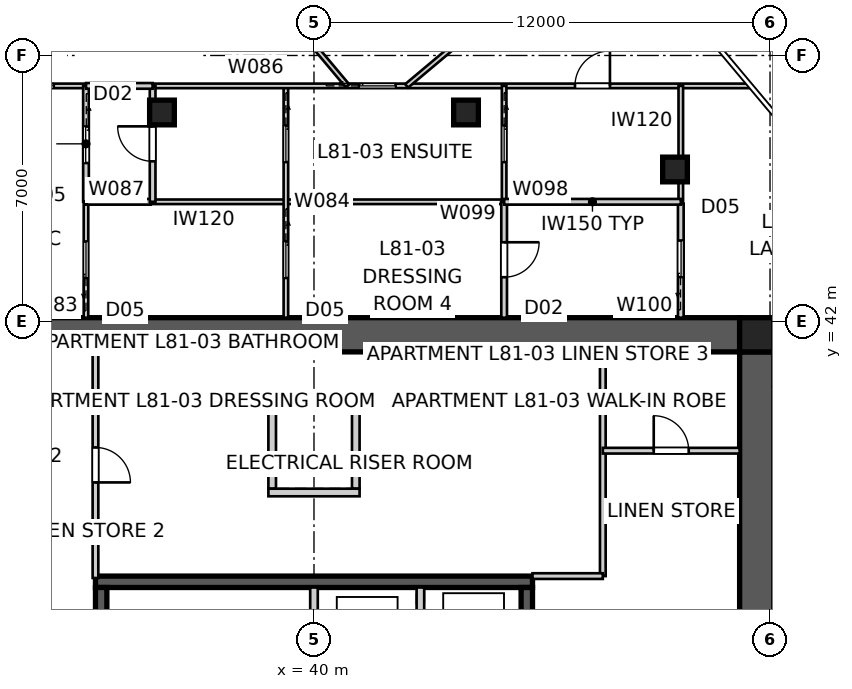
"""IFC4 building model, lengths in metres.
Left out: names, types, materials, properties, quantities, classifications, styles, units other than length and angle.
Written with IfcOpenShell. Run it as: python <this file> out.ifc"""

import sys

from ifc_helpers import new_model, si_unit, direction, frame, frame_2d, origin, origin_2d, place, context, subcontext, project, spatial, polyline, rectangle, outline, extrude, element, fill, save


model = new_model("IFC4")
c1 = context("Model", 3, precision=1e-05, world=origin(), true_north=direction((0.0, 1.0)))
c2 = subcontext(c1, "Body", "Model", "MODEL_VIEW")
j1 = project(units=[si_unit("LENGTHUNIT", "METRE"), si_unit("PLANEANGLEUNIT", "RADIAN")], contexts=[c1])
p1 = place(None, origin())
s1 = spatial("IfcSite", under=j1, at=p1, CompositionType="ELEMENT")
p2 = place(p1, origin())
s2 = spatial("IfcBuilding", under=s1, at=p2, CompositionType="ELEMENT")
p3 = place(p2, frame((0.0, 0.0, 293.0)))
s3 = spatial("IfcBuildingStorey", under=s2, at=p3, CompositionType="ELEMENT", Elevation=293.0)
p4 = place(p3, frame((28.8, 41.65, 0.0), z_axis=(0.0, 0.0, 1.0), x_axis=(1.0, 0.0, 0.0)))
e1 = element("IfcWall", 1, at=p4, inside=s3, PredefinedType="SHEAR", context=c2, shape_type="SweptSolid", body=[
    extrude(outline(polyline([(0.0, -0.45), (22.4, -0.45), (22.4, -0.025), (22.85, -0.025), (22.85, 0.025), (22.4, 0.025), (22.4, 0.45), (0.0, 0.45), (0.0, 0.025), (-0.45, 0.025), (-0.45, -0.025), (0.0, -0.025), (0.0, -0.45)])), origin(), (0.0, 0.0, 1.0), 3.4),
])
p5 = place(p3, frame((51.65, 18.8, 0.0), z_axis=(0.0, 0.0, 1.0), x_axis=(0.0, 1.0, 0.0)))
e2 = element("IfcWall", 2, at=p5, inside=s3, PredefinedType="SHEAR", context=c2, shape_type="SweptSolid", body=[
    extrude(outline(polyline([(0.0, -0.45), (22.4, -0.45), (22.4, -0.025), (22.85, -0.025), (22.85, 0.025), (22.4, 0.025), (22.4, 0.45), (0.0, 0.45), (0.0, 0.025), (-0.45, 0.025), (-0.45, -0.025), (0.0, -0.025), (0.0, -0.45)])), origin(), (0.0, 0.0, 1.0), 3.4),
])
p6 = place(p5, frame((11.14, 0.0, 0.0)))
e3 = element("IfcOpeningElement", 3, at=p6, cuts=e2, PredefinedType="OPENING", context=c2, shape_type="SweptSolid", body=[
    extrude(rectangle(XDim=1.02, YDim=2.4, at=frame_2d((0.51, 1.2))), frame((0.0, 0.46, 0.0), z_axis=(0.0, -1.0, 0.0), x_axis=(1.0, 0.0, 0.0)), (0.0, 0.0, 1.0), 0.92),
])
p7 = place(p3, frame((34.25, 35.15, 0.0), z_axis=(0.0, 0.0, 1.0), x_axis=(1.0, 0.0, 0.0)))
e4 = element("IfcWall", 4, at=p7, inside=s3, PredefinedType="SHEAR", context=c2, shape_type="SweptSolid", body=[
    extrude(rectangle(XDim=11.5, YDim=0.3, at=frame_2d((5.75, 0.0))), origin(), (0.0, 0.0, 1.0), 3.4),
])
p8 = place(p3, frame((34.4, 32.2, 0.0), z_axis=(0.0, 0.0, 1.0), x_axis=(0.0, 1.0, 0.0)))
e5 = element("IfcWall", 5, at=p8, inside=s3, PredefinedType="SHEAR", context=c2, shape_type="SweptSolid", body=[
    extrude(rectangle(XDim=2.8, YDim=0.3, at=frame_2d((1.4, 0.0))), origin(), (0.0, 0.0, 1.0), 3.4),
])
for number, where, z_axis, x_axis in (
    (6, (40.0, 32.2, 0.0), (0.0, 0.0, 1.0), (0.0, 1.0, 0.0)),
    (7, (42.8, 32.2, 0.0), (0.0, 0.0, 1.0), (0.0, 1.0, 0.0)),
):
    element("IfcWall", number, at=place(p3, frame(where, z_axis=z_axis, x_axis=x_axis)), inside=s3, PredefinedType="SOLIDWALL", context=c2, shape_type="SweptSolid", body=[
        extrude(rectangle(XDim=2.8, YDim=0.2, at=frame_2d((1.4, 0.0))), origin(), (0.0, 0.0, 1.0), 3.4),
    ])
p9 = place(p3, frame((45.6, 32.2, 0.0), z_axis=(0.0, 0.0, 1.0), x_axis=(0.0, 1.0, 0.0)))
e8 = element("IfcWall", 8, at=p9, inside=s3, PredefinedType="SHEAR", context=c2, shape_type="SweptSolid", body=[
    extrude(rectangle(XDim=2.8, YDim=0.3, at=frame_2d((1.4, 0.0))), origin(), (0.0, 0.0, 1.0), 3.4),
])
for number, where, z_axis, x_axis in (
    (9, (38.9, 37.6, 0.0), (0.0, 0.0, 1.0), (0.0, 1.0, 0.0)),
    (10, (41.1, 37.6, 0.0), (0.0, 0.0, 1.0), (0.0, 1.0, 0.0)),
):
    element("IfcWall", number, at=place(p3, frame(where, z_axis=z_axis, x_axis=x_axis)), inside=s3, PredefinedType="SOLIDWALL", context=c2, shape_type="SweptSolid", body=[
        extrude(rectangle(XDim=2.0, YDim=0.2, at=frame_2d((1.0, 0.0))), origin(), (0.0, 0.0, 1.0), 3.4),
    ])
for number, where, z_axis, x_axis in (
    (11, (38.8, 37.5, 0.0), (0.0, 0.0, 1.0), (1.0, 0.0, 0.0)),
    (12, (38.8, 39.7, 0.0), (0.0, 0.0, 1.0), (1.0, 0.0, 0.0)),
):
    element("IfcWall", number, at=place(p3, frame(where, z_axis=z_axis, x_axis=x_axis)), inside=s3, PredefinedType="SOLIDWALL", context=c2, shape_type="SweptSolid", body=[
        extrude(rectangle(XDim=2.4, YDim=0.2, at=frame_2d((1.2, 0.0))), origin(), (0.0, 0.0, 1.0), 3.4),
    ])
p10 = place(p3, frame((51.65, 41.65, 0.0), z_axis=(0.0, 0.0, 1.0), x_axis=(1.0, 0.0, 0.0)))
e13 = element("IfcColumn", 13, at=p10, inside=s3, PredefinedType="COLUMN", context=c2, shape_type="SweptSolid", body=[
    extrude(rectangle(XDim=0.9, YDim=0.9, at=origin_2d()), origin(), (0.0, 0.0, 1.0), 3.4),
])
for number, where, z_axis, x_axis in (
    (14, (49.5, 46.0, 0.0), (0.0, 0.0, 1.0), (1.0, 0.0, 0.0)),
    (15, (44.0, 47.5, 0.0), (0.0, 0.0, 1.0), (1.0, 0.0, 0.0)),
    (16, (36.0, 47.5, 0.0), (0.0, 0.0, 1.0), (1.0, 0.0, 0.0)),
):
    element("IfcColumn", number, at=place(p3, frame(where, z_axis=z_axis, x_axis=x_axis)), inside=s3, PredefinedType="COLUMN", context=c2, shape_type="SweptSolid", body=[
        extrude(rectangle(XDim=0.65, YDim=0.65, at=origin_2d()), origin(), (0.0, 0.0, 1.0), 3.4),
    ])
p11 = place(p3, frame((55.704, 43.177, 0.0), z_axis=(0.0, 0.0, 1.0), x_axis=(-0.76603440109, -0.64279957712, 0.0)))
e17 = element("IfcWall", 17, at=p11, inside=s3, PredefinedType="PARTITIONING", context=c2, shape_type="SweptSolid", body=[
    extrude(rectangle(XDim=4.64, YDim=0.25, at=frame_2d((2.32, 0.0))), origin(), (0.0, 0.0, 1.0), 3.25),
])
p12 = place(p3, frame((34.25, 41.2, 0.0), z_axis=(0.0, 0.0, 1.0), x_axis=(0.0, -1.0, 0.0)))
e18 = element("IfcWall", 18, at=p12, inside=s3, PredefinedType="SOLIDWALL", context=c2, shape_type="SweptSolid", body=[
    extrude(rectangle(XDim=5.95, YDim=0.15, at=frame_2d((2.975, 0.0))), origin(), (0.0, 0.0, 1.0), 3.25),
])
p13 = place(p12, frame((2.515, 0.0, 0.0)))
e19 = element("IfcOpeningElement", 19, at=p13, cuts=e18, PredefinedType="OPENING", context=c2, shape_type="SweptSolid", body=[
    extrude(rectangle(XDim=0.92, YDim=2.1, at=frame_2d((0.46, 1.05))), frame((0.0, 0.085, 0.0), z_axis=(0.0, -1.0, 0.0), x_axis=(1.0, 0.0, 0.0)), (0.0, 0.0, 1.0), 0.17),
])
p14 = place(p3, frame((47.6, 41.2, 0.0), z_axis=(0.0, 0.0, 1.0), x_axis=(0.0, -1.0, 0.0)))
e20 = element("IfcWall", 20, at=p14, inside=s3, PredefinedType="SOLIDWALL", context=c2, shape_type="SweptSolid", body=[
    extrude(rectangle(XDim=5.9, YDim=0.15, at=frame_2d((2.95, 0.0))), origin(), (0.0, 0.0, 1.0), 3.25),
])
p15 = place(p3, frame((47.6, 35.3, 0.0), z_axis=(0.0, 0.0, 1.0), x_axis=(-1.0, 0.0, 0.0)))
e21 = element("IfcWall", 21, at=p15, inside=s3, PredefinedType="SOLIDWALL", context=c2, shape_type="SweptSolid", body=[
    extrude(rectangle(XDim=1.85, YDim=0.15, at=frame_2d((0.925, 0.0))), origin(), (0.0, 0.0, 1.0), 3.25),
])
p16 = place(p3, frame((47.6, 38.6, 0.0), z_axis=(0.0, 0.0, 1.0), x_axis=(1.0, 0.0, 0.0)))
e22 = element("IfcWall", 22, at=p16, inside=s3, PredefinedType="SOLIDWALL", context=c2, shape_type="SweptSolid", body=[
    extrude(rectangle(XDim=3.6, YDim=0.15, at=frame_2d((1.8, 0.0))), origin(), (0.0, 0.0, 1.0), 3.25),
])
p17 = place(p16, frame((1.34, 0.0, 0.0)))
e23 = element("IfcOpeningElement", 23, at=p17, cuts=e22, PredefinedType="OPENING", context=c2, shape_type="SweptSolid", body=[
    extrude(rectangle(XDim=0.92, YDim=2.1, at=frame_2d((0.46, 1.05))), frame((0.0, 0.085, 0.0), z_axis=(0.0, -1.0, 0.0), x_axis=(1.0, 0.0, 0.0)), (0.0, 0.0, 1.0), 0.17),
])
p18 = place(p3, frame((35.704, 45.15, 0.0), z_axis=(0.0, 0.0, 1.0), x_axis=(1.0, 0.0, 0.0)))
e24 = element("IfcWall", 24, at=p18, inside=s3, PredefinedType="PARTITIONING", context=c2, shape_type="SweptSolid", body=[
    extrude(rectangle(XDim=9.3, YDim=0.12, at=frame_2d((4.65, 0.0))), origin(), (0.0, 0.0, 1.0), 3.25),
])
p19 = place(p3, frame((34.0, 42.1, 0.0), z_axis=(0.0, 0.0, 1.0), x_axis=(0.0, 1.0, 0.0)))
e25 = element("IfcWall", 25, at=p19, inside=s3, PredefinedType="PARTITIONING", context=c2, shape_type="SweptSolid", body=[
    extrude(rectangle(XDim=3.05, YDim=0.12, at=frame_2d((1.525, 0.0))), origin(), (0.0, 0.0, 1.0), 3.25),
])
p20 = place(p19, frame((1.045, 0.0, 0.0)))
e26 = element("IfcOpeningElement", 26, at=p20, cuts=e25, PredefinedType="OPENING", context=c2, shape_type="SweptSolid", body=[
    extrude(rectangle(XDim=0.96, YDim=2.1, at=frame_2d((0.48, 1.05))), frame((0.0, 0.07, 0.0), z_axis=(0.0, -1.0, 0.0), x_axis=(1.0, 0.0, 0.0)), (0.0, 0.0, 1.0), 0.14),
])
p21 = place(p3, frame((39.26, 48.2, 0.0), z_axis=(0.0, 0.0, 1.0), x_axis=(0.0, -1.0, 0.0)))
e27 = element("IfcWall", 27, at=p21, inside=s3, PredefinedType="PARTITIONING", context=c2, shape_type="SweptSolid", body=[
    extrude(rectangle(XDim=6.1, YDim=0.12, at=frame_2d((3.05, 0.0))), origin(), (0.0, 0.0, 1.0), 3.25),
])
p22 = place(p21, frame((4.095, 0.0, 0.0)))
e28 = element("IfcOpeningElement", 28, at=p22, cuts=e27, PredefinedType="OPENING", context=c2, shape_type="SweptSolid", body=[
    extrude(rectangle(XDim=0.96, YDim=2.1, at=frame_2d((0.48, 1.05))), frame((0.0, 0.07, 0.0), z_axis=(0.0, -1.0, 0.0), x_axis=(1.0, 0.0, 0.0)), (0.0, 0.0, 1.0), 0.14),
])
p23 = place(p21, frame((1.045, 0.0, 0.0)))
e29 = element("IfcOpeningElement", 29, at=p23, cuts=e27, PredefinedType="OPENING", context=c2, shape_type="SweptSolid", body=[
    extrude(rectangle(XDim=0.96, YDim=2.1, at=frame_2d((0.48, 1.05))), frame((0.0, 0.07, 0.0), z_axis=(0.0, -1.0, 0.0), x_axis=(1.0, 0.0, 0.0)), (0.0, 0.0, 1.0), 0.14),
])
p24 = place(p3, frame((34.0, 45.15, 0.0), z_axis=(0.0, 0.0, 1.0), x_axis=(1.0, 0.0, 0.0)))
e30 = element("IfcWall", 30, at=p24, inside=s3, PredefinedType="SOLIDWALL", context=c2, shape_type="SweptSolid", body=[
    extrude(rectangle(XDim=1.703, YDim=0.15, at=frame_2d((0.852, 0.0))), origin(), (0.0, 0.0, 1.0), 3.25),
])
p25 = place(p3, frame((35.754, 48.2, 0.0), z_axis=(0.0, 0.0, 1.0), x_axis=(1.0, 0.0, 0.0)))
e31 = element("IfcWall", 31, at=p25, inside=s3, PredefinedType="PARTITIONING", context=c2, shape_type="SweptSolid", body=[
    extrude(rectangle(XDim=15.683, YDim=0.12, at=frame_2d((7.842, 0.0))), origin(), (0.0, 0.0, 1.0), 3.25),
])
p26 = place(p25, frame((5.433, 0.0, 0.0)))
e32 = element("IfcOpeningElement", 32, at=p26, cuts=e31, PredefinedType="OPENING", context=c2, shape_type="SweptSolid", body=[
    extrude(rectangle(XDim=0.96, YDim=2.1, at=frame_2d((0.48, 1.05))), frame((0.0, 0.07, 0.0), z_axis=(0.0, -1.0, 0.0), x_axis=(1.0, 0.0, 0.0)), (0.0, 0.0, 1.0), 0.14),
])
p27 = place(p25, frame((11.114, 0.0, 0.0)))
e33 = element("IfcOpeningElement", 33, at=p27, cuts=e31, PredefinedType="OPENING", context=c2, shape_type="SweptSolid", body=[
    extrude(rectangle(XDim=0.92, YDim=2.34, at=frame_2d((0.46, 1.17))), frame((0.0, 0.07, 0.0), z_axis=(0.0, -1.0, 0.0), x_axis=(1.0, 0.0, 0.0)), (0.0, 0.0, 1.0), 0.14),
])
p28 = place(p3, frame((35.754, 45.15, 0.0), z_axis=(0.0, 0.0, 1.0), x_axis=(0.0, 1.0, 0.0)))
e34 = element("IfcWall", 34, at=p28, inside=s3, PredefinedType="SOLIDWALL", context=c2, shape_type="SweptSolid", body=[
    extrude(rectangle(XDim=3.05, YDim=0.15, at=frame_2d((1.525, 0.0))), origin(), (0.0, 0.0, 1.0), 3.25),
])
p29 = place(p28, frame((1.065, 0.0, 0.0)))
e35 = element("IfcOpeningElement", 35, at=p29, cuts=e34, PredefinedType="OPENING", context=c2, shape_type="SweptSolid", body=[
    extrude(rectangle(XDim=0.92, YDim=2.34, at=frame_2d((0.46, 1.17))), frame((0.0, 0.085, 0.0), z_axis=(0.0, -1.0, 0.0), x_axis=(1.0, 0.0, 0.0)), (0.0, 0.0, 1.0), 0.17),
])
p30 = place(p3, frame((31.344, 48.2, 0.0), z_axis=(0.0, 0.0, 1.0), x_axis=(1.0, 0.0, 0.0)))
e36 = element("IfcWall", 36, at=p30, inside=s3, PredefinedType="PARTITIONING", context=c2, shape_type="SweptSolid", body=[
    extrude(rectangle(XDim=2.656, YDim=0.12, at=frame_2d((1.328, 0.0))), origin(), (0.0, 0.0, 1.0), 3.25),
])
p31 = place(p30, frame((0.848, 0.0, 0.0)))
e37 = element("IfcOpeningElement", 37, at=p31, cuts=e36, PredefinedType="OPENING", context=c2, shape_type="SweptSolid", body=[
    extrude(rectangle(XDim=0.96, YDim=2.1, at=frame_2d((0.48, 1.05))), frame((0.0, 0.07, 0.0), z_axis=(0.0, -1.0, 0.0), x_axis=(1.0, 0.0, 0.0)), (0.0, 0.0, 1.0), 0.14),
])
p32 = place(p3, frame((34.0, 48.2, 0.0), z_axis=(0.0, 0.0, 1.0), x_axis=(0.0, -1.0, 0.0)))
e38 = element("IfcWall", 38, at=p32, inside=s3, PredefinedType="SOLIDWALL", context=c2, shape_type="SweptSolid", body=[
    extrude(rectangle(XDim=3.05, YDim=0.15, at=frame_2d((1.525, 0.0))), origin(), (0.0, 0.0, 1.0), 3.25),
])
p33 = place(p32, frame((1.07, 0.0, 0.0)))
e39 = element("IfcOpeningElement", 39, at=p33, cuts=e38, PredefinedType="OPENING", context=c2, shape_type="SweptSolid", body=[
    extrude(rectangle(XDim=0.96, YDim=2.1, at=frame_2d((0.48, 1.05))), frame((0.0, 0.085, 0.0), z_axis=(0.0, -1.0, 0.0), x_axis=(1.0, 0.0, 0.0)), (0.0, 0.0, 1.0), 0.17),
])
p34 = place(p3, frame((45.003, 48.2, 0.0), z_axis=(0.0, 0.0, 1.0), x_axis=(0.0, -1.0, 0.0)))
e40 = element("IfcWall", 40, at=p34, inside=s3, PredefinedType="PARTITIONING", context=c2, shape_type="SweptSolid", body=[
    extrude(rectangle(XDim=3.05, YDim=0.12, at=frame_2d((1.525, 0.0))), origin(), (0.0, 0.0, 1.0), 3.25),
])
p35 = place(p34, frame((1.045, 0.0, 0.0)))
e41 = element("IfcOpeningElement", 41, at=p35, cuts=e40, PredefinedType="OPENING", context=c2, shape_type="SweptSolid", body=[
    extrude(rectangle(XDim=0.96, YDim=2.1, at=frame_2d((0.48, 1.05))), frame((0.0, 0.07, 0.0), z_axis=(0.0, -1.0, 0.0), x_axis=(1.0, 0.0, 0.0)), (0.0, 0.0, 1.0), 0.14),
])
p36 = place(p3, frame((45.003, 45.15, 0.0), z_axis=(0.0, 0.0, 1.0), x_axis=(0.0, -1.0, 0.0)))
e42 = element("IfcWall", 42, at=p36, inside=s3, PredefinedType="SOLIDWALL", context=c2, shape_type="SweptSolid", body=[
    extrude(rectangle(XDim=3.05, YDim=0.15, at=frame_2d((1.525, 0.0))), origin(), (0.0, 0.0, 1.0), 3.25),
])
p37 = place(p36, frame((1.065, 0.0, 0.0)))
e43 = element("IfcOpeningElement", 43, at=p37, cuts=e42, PredefinedType="OPENING", context=c2, shape_type="SweptSolid", body=[
    extrude(rectangle(XDim=0.92, YDim=2.34, at=frame_2d((0.46, 1.17))), frame((0.0, 0.085, 0.0), z_axis=(0.0, -1.0, 0.0), x_axis=(1.0, 0.0, 0.0)), (0.0, 0.0, 1.0), 0.17),
])
p38 = place(p3, frame((49.652, 42.1, 0.0), z_axis=(0.0, 0.0, 1.0), x_axis=(0.0, 1.0, 0.0)))
e44 = element("IfcWall", 44, at=p38, inside=s3, PredefinedType="SOLIDWALL", context=c2, shape_type="SweptSolid", body=[
    extrude(rectangle(XDim=3.0, YDim=0.15, at=frame_2d((1.5, 0.0))), origin(), (0.0, 0.0, 1.0), 3.25),
])
p39 = place(p38, frame((1.07, 0.0, 0.0)))
e45 = element("IfcOpeningElement", 45, at=p39, cuts=e44, PredefinedType="OPENING", context=c2, shape_type="SweptSolid", body=[
    extrude(rectangle(XDim=0.96, YDim=2.1, at=frame_2d((0.48, 1.05))), frame((0.0, 0.085, 0.0), z_axis=(0.0, -1.0, 0.0), x_axis=(1.0, 0.0, 0.0)), (0.0, 0.0, 1.0), 0.17),
])
p40 = place(p3, frame((49.652, 45.1, 0.0), z_axis=(0.0, 0.0, 1.0), x_axis=(0.0, 1.0, 0.0)))
e46 = element("IfcWall", 46, at=p40, inside=s3, PredefinedType="PARTITIONING", context=c2, shape_type="SweptSolid", body=[
    extrude(rectangle(XDim=3.1, YDim=0.12, at=frame_2d((1.55, 0.0))), origin(), (0.0, 0.0, 1.0), 3.25),
])
p41 = place(p3, frame((45.003, 45.15, 0.0), z_axis=(0.0, 0.0, 1.0), x_axis=(1.0, 0.0, 0.0)))
e47 = element("IfcWall", 47, at=p41, inside=s3, PredefinedType="SOLIDWALL", context=c2, shape_type="SweptSolid", body=[
    extrude(rectangle(XDim=4.649, YDim=0.15, at=frame_2d((2.324, 0.0))), origin(), (0.0, 0.0, 1.0), 3.25),
])
p42 = place(p3, frame((40.883, 48.2, 0.0), z_axis=(0.0, 0.0, 1.0), x_axis=(-0.642790379821, 0.766042118691, 0.0)))
e48 = element("IfcWall", 48, at=p42, inside=s3, PredefinedType="PARTITIONING", context=c2, shape_type="SweptSolid", body=[
    extrude(rectangle(XDim=7.085, YDim=0.12, at=frame_2d((3.543, 0.0))), origin(), (0.0, 0.0, 1.0), 3.25),
])
p43 = place(p42, frame((4.64, 0.0, 0.0)))
e49 = element("IfcOpeningElement", 49, at=p43, cuts=e48, PredefinedType="OPENING", context=c2, shape_type="SweptSolid", body=[
    extrude(rectangle(XDim=0.92, YDim=2.34, at=frame_2d((0.46, 1.17))), frame((0.0, 0.07, 0.0), z_axis=(0.0, -1.0, 0.0), x_axis=(1.0, 0.0, 0.0)), (0.0, 0.0, 1.0), 0.14),
])
p44 = place(p3, frame((47.719, 52.631, 0.0), z_axis=(0.0, 0.0, 1.0), x_axis=(-0.766036842262, -0.642796667926, 0.0)))
e50 = element("IfcWall", 50, at=p44, inside=s3, PredefinedType="PARTITIONING", context=c2, shape_type="SweptSolid", body=[
    extrude(rectangle(XDim=6.894, YDim=0.12, at=frame_2d((3.447, 0.0))), origin(), (0.0, 0.0, 1.0), 3.25),
])
p45 = place(p3, frame((35.754, 48.2, 0.0), z_axis=(0.0, 0.0, 1.0), x_axis=(-1.0, 0.0, 0.0)))
e51 = element("IfcWall", 51, at=p45, inside=s3, PredefinedType="SOLIDWALL", context=c2, shape_type="SweptSolid", body=[
    extrude(rectangle(XDim=1.753, YDim=0.15, at=frame_2d((0.877, 0.0))), origin(), (0.0, 0.0, 1.0), 3.25),
])
p46 = place(p17, origin())
e52 = element("IfcDoor", 52, at=p46, inside=s3, OperationType="SINGLE_SWING_LEFT", PredefinedType="DOOR", context=c2, shape_type="SweptSolid", body=[
    extrude(rectangle(XDim=0.92, YDim=2.1, at=frame_2d((0.46, 1.05))), frame((0.0, 0.025, 0.0), z_axis=(0.0, -1.0, 0.0), x_axis=(1.0, 0.0, 0.0)), (0.0, 0.0, 1.0), 0.05),
])
fill(e23, e52)
p47 = place(p13, origin())
e53 = element("IfcDoor", 53, at=p47, inside=s3, OperationType="SINGLE_SWING_RIGHT", PredefinedType="DOOR", context=c2, shape_type="SweptSolid", body=[
    extrude(rectangle(XDim=0.92, YDim=2.1, at=frame_2d((0.46, 1.05))), frame((0.0, 0.025, 0.0), z_axis=(0.0, -1.0, 0.0), x_axis=(1.0, 0.0, 0.0)), (0.0, 0.0, 1.0), 0.05),
])
fill(e19, e53)
p48 = place(p33, origin())
e54 = element("IfcDoor", 54, at=p48, inside=s3, OperationType="SLIDING_TO_LEFT", PredefinedType="DOOR", context=c2, shape_type="SweptSolid", body=[
    extrude(rectangle(XDim=0.96, YDim=2.1, at=frame_2d((0.48, 1.05))), frame((0.0, 0.025, 0.0), z_axis=(0.0, -1.0, 0.0), x_axis=(1.0, 0.0, 0.0)), (0.0, 0.0, 1.0), 0.05),
])
fill(e39, e54)
p49 = place(p20, origin())
e55 = element("IfcDoor", 55, at=p49, inside=s3, OperationType="SLIDING_TO_LEFT", PredefinedType="DOOR", context=c2, shape_type="SweptSolid", body=[
    extrude(rectangle(XDim=0.96, YDim=2.1, at=frame_2d((0.48, 1.05))), frame((0.0, 0.025, 0.0), z_axis=(0.0, -1.0, 0.0), x_axis=(1.0, 0.0, 0.0)), (0.0, 0.0, 1.0), 0.05),
])
fill(e26, e55)
p50 = place(p31, origin())
e56 = element("IfcDoor", 56, at=p50, inside=s3, OperationType="SLIDING_TO_LEFT", PredefinedType="DOOR", context=c2, shape_type="SweptSolid", body=[
    extrude(rectangle(XDim=0.96, YDim=2.1, at=frame_2d((0.48, 1.05))), frame((0.0, 0.025, 0.0), z_axis=(0.0, -1.0, 0.0), x_axis=(1.0, 0.0, 0.0)), (0.0, 0.0, 1.0), 0.05),
])
fill(e37, e56)
p51 = place(p29, origin())
e57 = element("IfcDoor", 57, at=p51, inside=s3, OperationType="SINGLE_SWING_RIGHT", PredefinedType="DOOR", context=c2, shape_type="SweptSolid", body=[
    extrude(rectangle(XDim=0.92, YDim=2.34, at=frame_2d((0.46, 1.17))), frame((0.0, 0.025, 0.0), z_axis=(0.0, -1.0, 0.0), x_axis=(1.0, 0.0, 0.0)), (0.0, 0.0, 1.0), 0.05),
])
fill(e35, e57)
p52 = place(p22, origin())
e58 = element("IfcDoor", 58, at=p52, inside=s3, OperationType="SLIDING_TO_LEFT", PredefinedType="DOOR", context=c2, shape_type="SweptSolid", body=[
    extrude(rectangle(XDim=0.96, YDim=2.1, at=frame_2d((0.48, 1.05))), frame((0.0, 0.025, 0.0), z_axis=(0.0, -1.0, 0.0), x_axis=(1.0, 0.0, 0.0)), (0.0, 0.0, 1.0), 0.05),
])
fill(e28, e58)
p53 = place(p23, origin())
e59 = element("IfcDoor", 59, at=p53, inside=s3, OperationType="SLIDING_TO_LEFT", PredefinedType="DOOR", context=c2, shape_type="SweptSolid", body=[
    extrude(rectangle(XDim=0.96, YDim=2.1, at=frame_2d((0.48, 1.05))), frame((0.0, 0.025, 0.0), z_axis=(0.0, -1.0, 0.0), x_axis=(1.0, 0.0, 0.0)), (0.0, 0.0, 1.0), 0.05),
])
fill(e29, e59)
p54 = place(p37, origin())
e60 = element("IfcDoor", 60, at=p54, inside=s3, OperationType="SINGLE_SWING_LEFT", PredefinedType="DOOR", context=c2, shape_type="SweptSolid", body=[
    extrude(rectangle(XDim=0.92, YDim=2.34, at=frame_2d((0.46, 1.17))), frame((0.0, 0.025, 0.0), z_axis=(0.0, -1.0, 0.0), x_axis=(1.0, 0.0, 0.0)), (0.0, 0.0, 1.0), 0.05),
])
fill(e43, e60)
p55 = place(p35, origin())
e61 = element("IfcDoor", 61, at=p55, inside=s3, OperationType="SLIDING_TO_LEFT", PredefinedType="DOOR", context=c2, shape_type="SweptSolid", body=[
    extrude(rectangle(XDim=0.96, YDim=2.1, at=frame_2d((0.48, 1.05))), frame((0.0, 0.025, 0.0), z_axis=(0.0, -1.0, 0.0), x_axis=(1.0, 0.0, 0.0)), (0.0, 0.0, 1.0), 0.05),
])
fill(e41, e61)
p56 = place(p26, origin())
e62 = element("IfcDoor", 62, at=p56, inside=s3, OperationType="SLIDING_TO_LEFT", PredefinedType="DOOR", context=c2, shape_type="SweptSolid", body=[
    extrude(rectangle(XDim=0.96, YDim=2.1, at=frame_2d((0.48, 1.05))), frame((0.0, 0.025, 0.0), z_axis=(0.0, -1.0, 0.0), x_axis=(1.0, 0.0, 0.0)), (0.0, 0.0, 1.0), 0.05),
])
fill(e32, e62)
p57 = place(p39, origin())
e63 = element("IfcDoor", 63, at=p57, inside=s3, OperationType="SLIDING_TO_LEFT", PredefinedType="DOOR", context=c2, shape_type="SweptSolid", body=[
    extrude(rectangle(XDim=0.96, YDim=2.1, at=frame_2d((0.48, 1.05))), frame((0.0, 0.025, 0.0), z_axis=(0.0, -1.0, 0.0), x_axis=(1.0, 0.0, 0.0)), (0.0, 0.0, 1.0), 0.05),
])
fill(e45, e63)
p58 = place(p27, origin())
e64 = element("IfcDoor", 64, at=p58, inside=s3, OperationType="SINGLE_SWING_RIGHT", PredefinedType="DOOR", context=c2, shape_type="SweptSolid", body=[
    extrude(rectangle(XDim=0.92, YDim=2.34, at=frame_2d((0.46, 1.17))), frame((0.0, 0.025, 0.0), z_axis=(0.0, -1.0, 0.0), x_axis=(1.0, 0.0, 0.0)), (0.0, 0.0, 1.0), 0.05),
])
fill(e33, e64)
save(model, sys.argv[1])
